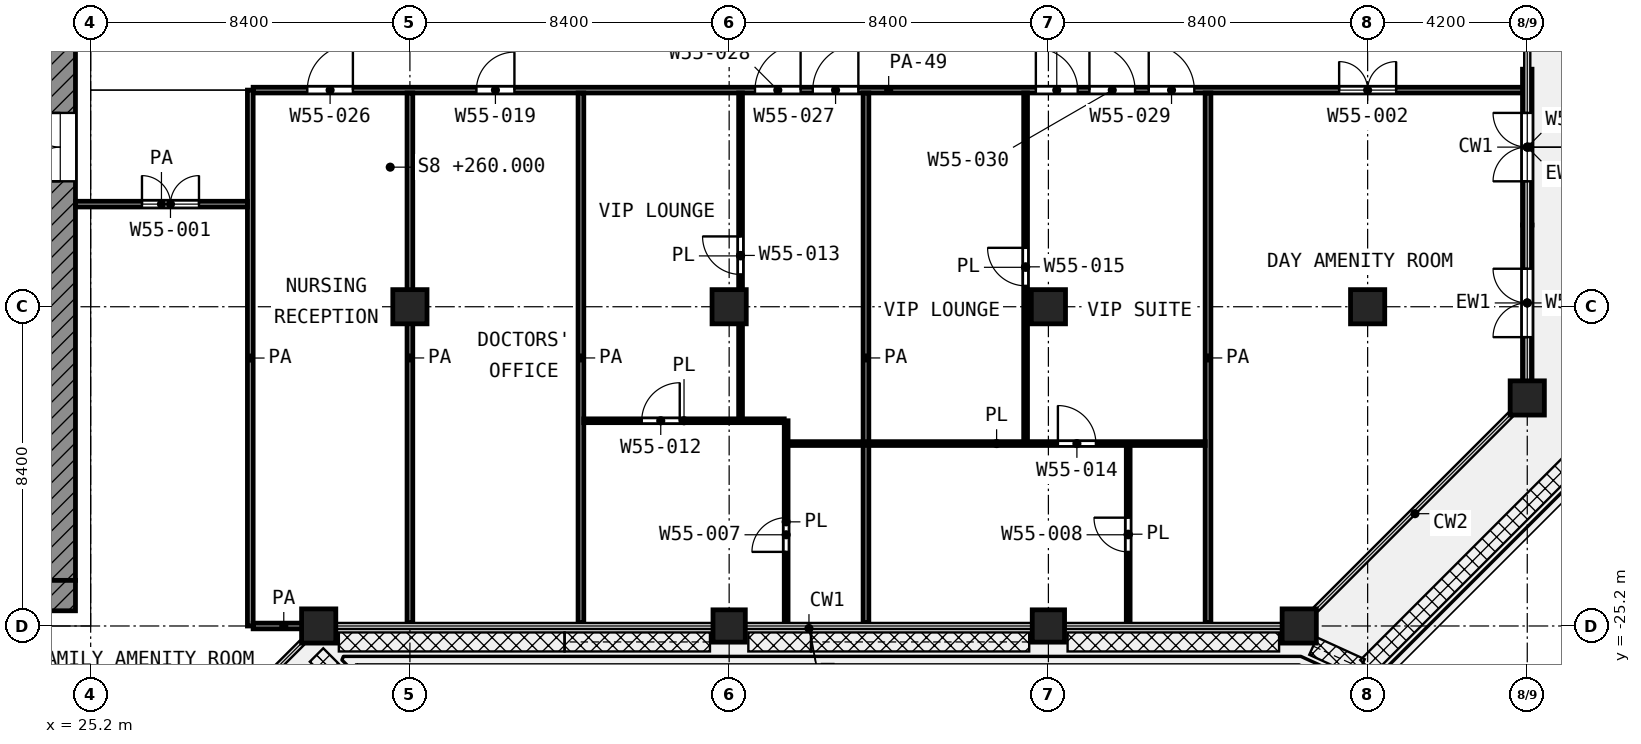
"""IFC4 building model, lengths in metres.
Left out: names, types, materials, properties, quantities, classifications, styles, units other than length and angle.
Written with IfcOpenShell. Run it as: python <this file> out.ifc"""

import sys

from ifc_helpers import new_model, si_unit, direction, frame, frame_2d, origin, origin_2d, place, context, subcontext, project, spatial, rectangle, extrude, element, fill, save


model = new_model("IFC4")
c1 = context("Model", 3, precision=1e-05, world=origin(), true_north=direction((0.0, 1.0)))
c2 = subcontext(c1, "Body", "Model", "MODEL_VIEW")
j1 = project(units=[si_unit("LENGTHUNIT", "METRE"), si_unit("PLANEANGLEUNIT", "RADIAN")], contexts=[c1])
p1 = place(None, origin())
s1 = spatial("IfcSite", under=j1, at=p1, CompositionType="ELEMENT")
p2 = place(p1, origin())
s2 = spatial("IfcBuilding", under=s1, at=p2, CompositionType="ELEMENT")
p3 = place(p2, frame((0.0, 0.0, 260.0)))
s3 = spatial("IfcBuildingStorey", under=s2, at=p3, CompositionType="ELEMENT", Elevation=260.0)
for number, where, z_axis, x_axis in (
    (1, (33.6, -16.8, 0.0), (0.0, 0.0, 1.0), (1.0, 0.0, 0.0)),
    (2, (42.0, -16.8, 0.0), (0.0, 0.0, 1.0), (1.0, 0.0, 0.0)),
    (3, (50.4, -16.8, 0.0), (0.0, 0.0, 1.0), (1.0, 0.0, 0.0)),
    (4, (58.8, -16.8, 0.0), (0.0, 0.0, 1.0), (1.0, 0.0, 0.0)),
    (5, (63.0, -19.2, 0.0), (0.0, 0.0, 1.0), (1.0, 0.0, 0.0)),
    (6, (31.2, -25.2, 0.0), (0.0, 0.0, 1.0), (1.0, 0.0, 0.0)),
):
    element("IfcColumn", number, at=place(p3, frame(where, z_axis=z_axis, x_axis=x_axis)), inside=s3, PredefinedType="COLUMN", context=c2, shape_type="SweptSolid", body=[
        extrude(rectangle(XDim=0.9, YDim=0.9, at=origin_2d()), origin(), (0.0, 0.0, 1.0), 4.2),
    ])
for number, where, z_axis, x_axis in (
    (7, (42.0, -25.2, 0.0), (0.0, 0.0, 1.0), (1.0, 0.0, 0.0)),
    (8, (50.4, -25.2, 0.0), (0.0, 0.0, 1.0), (1.0, 0.0, 0.0)),
):
    element("IfcColumn", number, at=place(p3, frame(where, z_axis=z_axis, x_axis=x_axis)), inside=s3, PredefinedType="COLUMN", context=c2, shape_type="SweptSolid", body=[
        extrude(rectangle(XDim=0.85, YDim=0.85, at=origin_2d()), origin(), (0.0, 0.0, 1.0), 4.2),
    ])
p4 = place(p3, frame((57.0, -25.2, 0.0), z_axis=(0.0, 0.0, 1.0), x_axis=(1.0, 0.0, 0.0)))
e9 = element("IfcColumn", 9, at=p4, inside=s3, PredefinedType="COLUMN", context=c2, shape_type="SweptSolid", body=[
    extrude(rectangle(XDim=0.9, YDim=0.9, at=origin_2d()), origin(), (0.0, 0.0, 1.0), 4.2),
])
p5 = place(p3, frame((63.0, -18.75, 0.0), z_axis=(0.0, 0.0, 1.0), x_axis=(0.0, 1.0, 0.0)))
e10 = element("IfcWall", 10, at=p5, inside=s3, PredefinedType="SOLIDWALL", context=c2, shape_type="SweptSolid", body=[
    extrude(rectangle(XDim=4.1, YDim=0.25, at=frame_2d((2.05, 0.0))), origin(), (0.0, 0.0, 1.0), 2.58),
])
p6 = place(p5, frame((1.15, 0.0, 0.0)))
e11 = element("IfcOpeningElement", 11, at=p6, cuts=e10, PredefinedType="OPENING", context=c2, shape_type="SweptSolid", body=[
    extrude(rectangle(XDim=1.8, YDim=2.1, at=frame_2d((0.9, 1.05))), frame((0.0, 0.135, 0.0), z_axis=(0.0, -1.0, 0.0), x_axis=(1.0, 0.0, 0.0)), (0.0, 0.0, 1.0), 0.27),
])
p7 = place(p3, frame((63.0, -14.65, 0.0), z_axis=(0.0, 0.0, 1.0), x_axis=(0.0, 1.0, 0.0)))
e12 = element("IfcWall", 12, at=p7, inside=s3, PredefinedType="SOLIDWALL", context=c2, shape_type="SweptSolid", body=[
    extrude(rectangle(XDim=4.1, YDim=0.25, at=frame_2d((2.05, 0.0))), origin(), (0.0, 0.0, 1.0), 2.58),
])
p8 = place(p7, frame((1.15, 0.0, 0.0)))
e13 = element("IfcOpeningElement", 13, at=p8, cuts=e12, PredefinedType="OPENING", context=c2, shape_type="SweptSolid", body=[
    extrude(rectangle(XDim=1.8, YDim=2.1, at=frame_2d((0.9, 1.05))), frame((0.0, 0.135, 0.0), z_axis=(0.0, -1.0, 0.0), x_axis=(1.0, 0.0, 0.0)), (0.0, 0.0, 1.0), 0.27),
])
p9 = place(p3, frame((24.4, -24.0, 0.0), z_axis=(0.0, 0.0, 1.0), x_axis=(0.0, 1.0, 0.0)))
e14 = element("IfcWall", 14, at=p9, inside=s3, PredefinedType="SHEAR", context=c2, shape_type="SweptSolid", body=[
    extrude(rectangle(XDim=18.6, YDim=0.8, at=frame_2d((9.3, 0.0))), origin(), (0.0, 0.0, 1.0), 3.6),
])
p10 = place(p9, frame((10.5, 0.0, 0.0)))
e15 = element("IfcOpeningElement", 15, at=p10, cuts=e14, PredefinedType="OPENING", context=c2, shape_type="SweptSolid", body=[
    extrude(rectangle(XDim=1.8, YDim=2.1, at=frame_2d((0.9, 1.05))), frame((0.0, 0.41, 0.0), z_axis=(0.0, -1.0, 0.0), x_axis=(1.0, 0.0, 0.0)), (0.0, 0.0, 1.0), 0.82),
])
p11 = place(p3, frame((24.4, -24.8, 0.0), z_axis=(0.0, 0.0, 1.0), x_axis=(0.0, 1.0, 0.0)))
e16 = element("IfcWall", 16, at=p11, inside=s3, PredefinedType="SHEAR", context=c2, shape_type="SweptSolid", body=[
    extrude(rectangle(XDim=0.8, YDim=0.8, at=frame_2d((0.4, 0.0))), origin(), (0.0, 0.0, 1.0), 3.6),
])
p12 = place(p3, frame((43.55, -20.4, 0.0), z_axis=(0.0, 0.0, 1.0), x_axis=(1.0, 0.0, 0.0)))
e17 = element("IfcWall", 17, at=p12, inside=s3, PredefinedType="PARTITIONING", context=c2, shape_type="SweptSolid", body=[
    extrude(rectangle(XDim=10.975, YDim=0.1, at=frame_2d((5.487, 0.0))), origin(), (0.0, 0.0, 1.0), 3.6),
])
p13 = place(p12, frame((7.1, 0.0, 0.0)))
e18 = element("IfcOpeningElement", 18, at=p13, cuts=e17, PredefinedType="OPENING", context=c2, shape_type="SweptSolid", body=[
    extrude(rectangle(XDim=1.0, YDim=2.1, at=frame_2d((0.5, 1.05))), frame((0.0, 0.06, 0.0), z_axis=(0.0, -1.0, 0.0), x_axis=(1.0, 0.0, 0.0)), (0.0, 0.0, 1.0), 0.12),
])
p14 = place(p3, frame((38.175, -19.8, 0.0), z_axis=(0.0, 0.0, 1.0), x_axis=(1.0, 0.0, 0.0)))
e19 = element("IfcWall", 19, at=p14, inside=s3, PredefinedType="PARTITIONING", context=c2, shape_type="SweptSolid", body=[
    extrude(rectangle(XDim=5.275, YDim=0.1, at=frame_2d((2.637, 0.0))), origin(), (0.0, 0.0, 1.0), 3.6),
])
p15 = place(p14, frame((1.525, 0.0, 0.0)))
e20 = element("IfcOpeningElement", 20, at=p15, cuts=e19, PredefinedType="OPENING", context=c2, shape_type="SweptSolid", body=[
    extrude(rectangle(XDim=1.0, YDim=2.1, at=frame_2d((0.5, 1.05))), frame((0.0, 0.06, 0.0), z_axis=(0.0, -1.0, 0.0), x_axis=(1.0, 0.0, 0.0)), (0.0, 0.0, 1.0), 0.12),
])
p16 = place(p3, frame((42.3, -19.75, 0.0), z_axis=(0.0, 0.0, 1.0), x_axis=(0.0, 1.0, 0.0)))
e21 = element("IfcWall", 21, at=p16, inside=s3, PredefinedType="PARTITIONING", context=c2, shape_type="SweptSolid", body=[
    extrude(rectangle(XDim=8.575, YDim=0.1, at=frame_2d((4.288, 0.0))), origin(), (0.0, 0.0, 1.0), 3.6),
])
p17 = place(p16, frame((3.8, 0.0, 0.0)))
e22 = element("IfcOpeningElement", 22, at=p17, cuts=e21, PredefinedType="OPENING", context=c2, shape_type="SweptSolid", body=[
    extrude(rectangle(XDim=1.0, YDim=2.1, at=frame_2d((0.5, 1.05))), frame((0.0, 0.06, 0.0), z_axis=(0.0, -1.0, 0.0), x_axis=(1.0, 0.0, 0.0)), (0.0, 0.0, 1.0), 0.12),
])
p18 = place(p3, frame((43.5, -25.12, 0.0), z_axis=(0.0, 0.0, 1.0), x_axis=(0.0, 1.0, 0.0)))
e23 = element("IfcWall", 23, at=p18, inside=s3, PredefinedType="PARTITIONING", context=c2, shape_type="SweptSolid", body=[
    extrude(rectangle(XDim=5.32, YDim=0.1, at=frame_2d((2.66, 0.0))), origin(), (0.0, 0.0, 1.0), 3.6),
])
p19 = place(p18, frame((1.87, 0.0, 0.0)))
e24 = element("IfcOpeningElement", 24, at=p19, cuts=e23, PredefinedType="OPENING", context=c2, shape_type="SweptSolid", body=[
    extrude(rectangle(XDim=0.9, YDim=2.1, at=frame_2d((0.45, 1.05))), frame((0.0, 0.06, 0.0), z_axis=(0.0, -1.0, 0.0), x_axis=(1.0, 0.0, 0.0)), (0.0, 0.0, 1.0), 0.12),
])
p20 = place(p3, frame((49.8, -20.35, 0.0), z_axis=(0.0, 0.0, 1.0), x_axis=(0.0, 1.0, 0.0)))
e25 = element("IfcWall", 25, at=p20, inside=s3, PredefinedType="PARTITIONING", context=c2, shape_type="SweptSolid", body=[
    extrude(rectangle(XDim=9.175, YDim=0.1, at=frame_2d((4.587, 0.0))), origin(), (0.0, 0.0, 1.0), 3.6),
])
p21 = place(p20, frame((4.1, 0.0, 0.0)))
e26 = element("IfcOpeningElement", 26, at=p21, cuts=e25, PredefinedType="OPENING", context=c2, shape_type="SweptSolid", body=[
    extrude(rectangle(XDim=1.0, YDim=2.1, at=frame_2d((0.5, 1.05))), frame((0.0, 0.06, 0.0), z_axis=(0.0, -1.0, 0.0), x_axis=(1.0, 0.0, 0.0)), (0.0, 0.0, 1.0), 0.12),
])
p22 = place(p3, frame((52.5, -25.12, 0.0), z_axis=(0.0, 0.0, 1.0), x_axis=(0.0, 1.0, 0.0)))
e27 = element("IfcWall", 27, at=p22, inside=s3, PredefinedType="PARTITIONING", context=c2, shape_type="SweptSolid", body=[
    extrude(rectangle(XDim=4.67, YDim=0.1, at=frame_2d((2.335, 0.0))), origin(), (0.0, 0.0, 1.0), 3.6),
])
p23 = place(p22, frame((1.87, 0.0, 0.0)))
e28 = element("IfcOpeningElement", 28, at=p23, cuts=e27, PredefinedType="OPENING", context=c2, shape_type="SweptSolid", body=[
    extrude(rectangle(XDim=0.9, YDim=2.1, at=frame_2d((0.45, 1.05))), frame((0.0, 0.06, 0.0), z_axis=(0.0, -1.0, 0.0), x_axis=(1.0, 0.0, 0.0)), (0.0, 0.0, 1.0), 0.12),
])
p24 = place(p3, frame((29.475, -25.2, 0.0), z_axis=(0.0, 0.0, 1.0), x_axis=(1.0, 0.0, 0.0)))
e29 = element("IfcWall", 29, at=p24, inside=s3, PredefinedType="PARTITIONING", context=c2, shape_type="SweptSolid", body=[
    extrude(rectangle(XDim=1.612, YDim=0.15, at=frame_2d((0.806, 0.0))), origin(), (0.0, 0.0, 1.0), 3.6),
])
p25 = place(p3, frame((24.8, -14.1, 0.0), z_axis=(0.0, 0.0, 1.0), x_axis=(1.0, 0.0, 0.0)))
e30 = element("IfcWall", 30, at=p25, inside=s3, PredefinedType="PARTITIONING", context=c2, shape_type="SweptSolid", body=[
    extrude(rectangle(XDim=4.525, YDim=0.15, at=frame_2d((2.262, 0.0))), origin(), (0.0, 0.0, 1.0), 3.6),
])
p26 = place(p25, frame((1.75, 0.0, 0.0)))
e31 = element("IfcOpeningElement", 31, at=p26, cuts=e30, PredefinedType="OPENING", context=c2, shape_type="SweptSolid", body=[
    extrude(rectangle(XDim=1.5, YDim=2.1, at=frame_2d((0.75, 1.05))), frame((0.0, 0.085, 0.0), z_axis=(0.0, -1.0, 0.0), x_axis=(1.0, 0.0, 0.0)), (0.0, 0.0, 1.0), 0.17),
])
p27 = place(p3, frame((29.475, -11.1, 0.0), z_axis=(0.0, 0.0, 1.0), x_axis=(1.0, 0.0, 0.0)))
e32 = element("IfcWall", 32, at=p27, inside=s3, PredefinedType="PARTITIONING", context=c2, shape_type="SweptSolid", body=[
    extrude(rectangle(XDim=33.445, YDim=0.15, at=frame_2d((16.722, 0.0))), origin(), (0.0, 0.0, 1.0), 2.7),
])
p28 = place(p27, frame((1.425, 0.0, 0.0)))
e33 = element("IfcOpeningElement", 33, at=p28, cuts=e32, PredefinedType="OPENING", context=c2, shape_type="SweptSolid", body=[
    extrude(rectangle(XDim=1.2, YDim=2.1, at=frame_2d((0.6, 1.05))), frame((0.0, 0.085, 0.0), z_axis=(0.0, -1.0, 0.0), x_axis=(1.0, 0.0, 0.0)), (0.0, 0.0, 1.0), 0.17),
])
p29 = place(p27, frame((5.875, 0.0, 0.0)))
e34 = element("IfcOpeningElement", 34, at=p29, cuts=e32, PredefinedType="OPENING", context=c2, shape_type="SweptSolid", body=[
    extrude(rectangle(XDim=1.0, YDim=2.1, at=frame_2d((0.5, 1.05))), frame((0.0, 0.085, 0.0), z_axis=(0.0, -1.0, 0.0), x_axis=(1.0, 0.0, 0.0)), (0.0, 0.0, 1.0), 0.17),
])
p30 = place(p27, frame((14.725, 0.0, 0.0)))
e35 = element("IfcOpeningElement", 35, at=p30, cuts=e32, PredefinedType="OPENING", context=c2, shape_type="SweptSolid", body=[
    extrude(rectangle(XDim=1.2, YDim=2.1, at=frame_2d((0.6, 1.05))), frame((0.0, 0.085, 0.0), z_axis=(0.0, -1.0, 0.0), x_axis=(1.0, 0.0, 0.0)), (0.0, 0.0, 1.0), 0.17),
])
p31 = place(p27, frame((13.205, 0.0, 0.0)))
e36 = element("IfcOpeningElement", 36, at=p31, cuts=e32, PredefinedType="OPENING", context=c2, shape_type="SweptSolid", body=[
    extrude(rectangle(XDim=1.2, YDim=2.1, at=frame_2d((0.6, 1.05))), frame((0.0, 0.085, 0.0), z_axis=(0.0, -1.0, 0.0), x_axis=(1.0, 0.0, 0.0)), (0.0, 0.0, 1.0), 0.17),
])
p32 = place(p27, frame((23.565, 0.0, 0.0)))
e37 = element("IfcOpeningElement", 37, at=p32, cuts=e32, PredefinedType="OPENING", context=c2, shape_type="SweptSolid", body=[
    extrude(rectangle(XDim=1.2, YDim=2.1, at=frame_2d((0.6, 1.05))), frame((0.0, 0.085, 0.0), z_axis=(0.0, -1.0, 0.0), x_axis=(1.0, 0.0, 0.0)), (0.0, 0.0, 1.0), 0.17),
])
p33 = place(p27, frame((22.005, 0.0, 0.0)))
e38 = element("IfcOpeningElement", 38, at=p33, cuts=e32, PredefinedType="OPENING", context=c2, shape_type="SweptSolid", body=[
    extrude(rectangle(XDim=1.2, YDim=2.1, at=frame_2d((0.6, 1.05))), frame((0.0, 0.085, 0.0), z_axis=(0.0, -1.0, 0.0), x_axis=(1.0, 0.0, 0.0)), (0.0, 0.0, 1.0), 0.17),
])
p34 = place(p27, frame((20.595, 0.0, 0.0)))
e39 = element("IfcOpeningElement", 39, at=p34, cuts=e32, PredefinedType="OPENING", context=c2, shape_type="SweptSolid", body=[
    extrude(rectangle(XDim=1.1, YDim=2.1, at=frame_2d((0.55, 1.05))), frame((0.0, 0.085, 0.0), z_axis=(0.0, -1.0, 0.0), x_axis=(1.0, 0.0, 0.0)), (0.0, 0.0, 1.0), 0.17),
])
p35 = place(p27, frame((28.575, 0.0, 0.0)))
e40 = element("IfcOpeningElement", 40, at=p35, cuts=e32, PredefinedType="OPENING", context=c2, shape_type="SweptSolid", body=[
    extrude(rectangle(XDim=1.5, YDim=2.1, at=frame_2d((0.75, 1.05))), frame((0.0, 0.085, 0.0), z_axis=(0.0, -1.0, 0.0), x_axis=(1.0, 0.0, 0.0)), (0.0, 0.0, 1.0), 0.17),
])
p36 = place(p3, frame((29.4, -25.2, 0.0), z_axis=(0.0, 0.0, 1.0), x_axis=(0.0, 1.0, 0.0)))
e41 = element("IfcWall", 41, at=p36, inside=s3, PredefinedType="PARTITIONING", context=c2, shape_type="SweptSolid", body=[
    extrude(rectangle(XDim=14.1, YDim=0.15, at=frame_2d((7.05, 0.0))), origin(), (0.0, 0.0, 1.0), 3.6),
])
for number, where, z_axis, x_axis in (
    (42, (33.6, -25.12, 0.0), (0.0, 0.0, 1.0), (0.0, 1.0, 0.0)),
    (43, (38.1, -25.12, 0.0), (0.0, 0.0, 1.0), (0.0, 1.0, 0.0)),
    (44, (45.6, -25.12, 0.0), (0.0, 0.0, 1.0), (0.0, 1.0, 0.0)),
    (45, (54.6, -25.12, 0.0), (0.0, 0.0, 1.0), (0.0, 1.0, 0.0)),
):
    element("IfcWall", number, at=place(p3, frame(where, z_axis=z_axis, x_axis=x_axis)), inside=s3, PredefinedType="PARTITIONING", context=c2, shape_type="SweptSolid", body=[
        extrude(rectangle(XDim=13.945, YDim=0.15, at=frame_2d((6.973, 0.0))), origin(), (0.0, 0.0, 1.0), 3.6),
    ])
p37 = place(p6, origin())
e46 = element("IfcDoor", 46, at=p37, inside=s3, OperationType="DOUBLE_DOOR_SINGLE_SWING", PredefinedType="DOOR", context=c2, shape_type="SweptSolid", body=[
    extrude(rectangle(XDim=1.8, YDim=2.1, at=frame_2d((0.9, 1.05))), frame((0.0, 0.025, 0.0), z_axis=(0.0, -1.0, 0.0), x_axis=(1.0, 0.0, 0.0)), (0.0, 0.0, 1.0), 0.05),
])
fill(e11, e46)
p38 = place(p8, origin())
e47 = element("IfcDoor", 47, at=p38, inside=s3, OperationType="DOUBLE_DOOR_SINGLE_SWING", PredefinedType="DOOR", context=c2, shape_type="SweptSolid", body=[
    extrude(rectangle(XDim=1.8, YDim=2.1, at=frame_2d((0.9, 1.05))), frame((0.0, 0.025, 0.0), z_axis=(0.0, -1.0, 0.0), x_axis=(1.0, 0.0, 0.0)), (0.0, 0.0, 1.0), 0.05),
])
fill(e13, e47)
p39 = place(p10, origin())
e48 = element("IfcDoor", 48, at=p39, inside=s3, OperationType="DOUBLE_DOOR_SINGLE_SWING", PredefinedType="DOOR", context=c2, shape_type="SweptSolid", body=[
    extrude(rectangle(XDim=1.8, YDim=2.1, at=frame_2d((0.9, 1.05))), frame((0.0, 0.025, 0.0), z_axis=(0.0, -1.0, 0.0), x_axis=(1.0, 0.0, 0.0)), (0.0, 0.0, 1.0), 0.05),
])
fill(e15, e48)
p40 = place(p26, origin())
e49 = element("IfcDoor", 49, at=p40, inside=s3, OperationType="DOUBLE_DOOR_SINGLE_SWING", PredefinedType="DOOR", context=c2, shape_type="SweptSolid", body=[
    extrude(rectangle(XDim=1.5, YDim=2.1, at=frame_2d((0.75, 1.05))), frame((0.0, 0.025, 0.0), z_axis=(0.0, -1.0, 0.0), x_axis=(1.0, 0.0, 0.0)), (0.0, 0.0, 1.0), 0.05),
])
fill(e31, e49)
p41 = place(p28, origin())
e50 = element("IfcDoor", 50, at=p41, inside=s3, OperationType="SINGLE_SWING_RIGHT", PredefinedType="DOOR", context=c2, shape_type="SweptSolid", body=[
    extrude(rectangle(XDim=1.2, YDim=2.1, at=frame_2d((0.6, 1.05))), frame((0.0, 0.025, 0.0), z_axis=(0.0, -1.0, 0.0), x_axis=(1.0, 0.0, 0.0)), (0.0, 0.0, 1.0), 0.05),
])
fill(e33, e50)
p42 = place(p29, origin())
e51 = element("IfcDoor", 51, at=p42, inside=s3, OperationType="SINGLE_SWING_RIGHT", PredefinedType="DOOR", context=c2, shape_type="SweptSolid", body=[
    extrude(rectangle(XDim=1.0, YDim=2.1, at=frame_2d((0.5, 1.05))), frame((0.0, 0.025, 0.0), z_axis=(0.0, -1.0, 0.0), x_axis=(1.0, 0.0, 0.0)), (0.0, 0.0, 1.0), 0.05),
])
fill(e34, e51)
p43 = place(p30, origin())
e52 = element("IfcDoor", 52, at=p43, inside=s3, OperationType="SINGLE_SWING_RIGHT", PredefinedType="DOOR", context=c2, shape_type="SweptSolid", body=[
    extrude(rectangle(XDim=1.2, YDim=2.1, at=frame_2d((0.6, 1.05))), frame((0.0, 0.025, 0.0), z_axis=(0.0, -1.0, 0.0), x_axis=(1.0, 0.0, 0.0)), (0.0, 0.0, 1.0), 0.05),
])
fill(e35, e52)
p44 = place(p31, origin())
e53 = element("IfcDoor", 53, at=p44, inside=s3, OperationType="SINGLE_SWING_RIGHT", PredefinedType="DOOR", context=c2, shape_type="SweptSolid", body=[
    extrude(rectangle(XDim=1.2, YDim=2.1, at=frame_2d((0.6, 1.05))), frame((0.0, 0.025, 0.0), z_axis=(0.0, -1.0, 0.0), x_axis=(1.0, 0.0, 0.0)), (0.0, 0.0, 1.0), 0.05),
])
fill(e36, e53)
p45 = place(p15, origin())
e54 = element("IfcDoor", 54, at=p45, inside=s3, OperationType="SINGLE_SWING_RIGHT", PredefinedType="DOOR", context=c2, shape_type="SweptSolid", body=[
    extrude(rectangle(XDim=1.0, YDim=2.1, at=frame_2d((0.5, 1.05))), frame((0.0, 0.025, 0.0), z_axis=(0.0, -1.0, 0.0), x_axis=(1.0, 0.0, 0.0)), (0.0, 0.0, 1.0), 0.05),
])
fill(e20, e54)
p46 = place(p17, origin())
e55 = element("IfcDoor", 55, at=p46, inside=s3, OperationType="SINGLE_SWING_RIGHT", PredefinedType="DOOR", context=c2, shape_type="SweptSolid", body=[
    extrude(rectangle(XDim=1.0, YDim=2.1, at=frame_2d((0.5, 1.05))), frame((0.0, 0.025, 0.0), z_axis=(0.0, -1.0, 0.0), x_axis=(1.0, 0.0, 0.0)), (0.0, 0.0, 1.0), 0.05),
])
fill(e22, e55)
p47 = place(p19, origin())
e56 = element("IfcDoor", 56, at=p47, inside=s3, OperationType="SINGLE_SWING_LEFT", PredefinedType="DOOR", context=c2, shape_type="SweptSolid", body=[
    extrude(rectangle(XDim=0.9, YDim=2.1, at=frame_2d((0.45, 1.05))), frame((0.0, 0.025, 0.0), z_axis=(0.0, -1.0, 0.0), x_axis=(1.0, 0.0, 0.0)), (0.0, 0.0, 1.0), 0.05),
])
fill(e24, e56)
p48 = place(p32, origin())
e57 = element("IfcDoor", 57, at=p48, inside=s3, OperationType="SINGLE_SWING_LEFT", PredefinedType="DOOR", context=c2, shape_type="SweptSolid", body=[
    extrude(rectangle(XDim=1.2, YDim=2.1, at=frame_2d((0.6, 1.05))), frame((0.0, 0.025, 0.0), z_axis=(0.0, -1.0, 0.0), x_axis=(1.0, 0.0, 0.0)), (0.0, 0.0, 1.0), 0.05),
])
fill(e37, e57)
p49 = place(p33, origin())
e58 = element("IfcDoor", 58, at=p49, inside=s3, OperationType="SINGLE_SWING_LEFT", PredefinedType="DOOR", context=c2, shape_type="SweptSolid", body=[
    extrude(rectangle(XDim=1.2, YDim=2.1, at=frame_2d((0.6, 1.05))), frame((0.0, 0.025, 0.0), z_axis=(0.0, -1.0, 0.0), x_axis=(1.0, 0.0, 0.0)), (0.0, 0.0, 1.0), 0.05),
])
fill(e38, e58)
p50 = place(p34, origin())
e59 = element("IfcDoor", 59, at=p50, inside=s3, OperationType="SINGLE_SWING_LEFT", PredefinedType="DOOR", context=c2, shape_type="SweptSolid", body=[
    extrude(rectangle(XDim=1.1, YDim=2.1, at=frame_2d((0.55, 1.05))), frame((0.0, 0.025, 0.0), z_axis=(0.0, -1.0, 0.0), x_axis=(1.0, 0.0, 0.0)), (0.0, 0.0, 1.0), 0.05),
])
fill(e39, e59)
p51 = place(p13, origin())
e60 = element("IfcDoor", 60, at=p51, inside=s3, OperationType="SINGLE_SWING_LEFT", PredefinedType="DOOR", context=c2, shape_type="SweptSolid", body=[
    extrude(rectangle(XDim=1.0, YDim=2.1, at=frame_2d((0.5, 1.05))), frame((0.0, 0.025, 0.0), z_axis=(0.0, -1.0, 0.0), x_axis=(1.0, 0.0, 0.0)), (0.0, 0.0, 1.0), 0.05),
])
fill(e18, e60)
p52 = place(p21, origin())
e61 = element("IfcDoor", 61, at=p52, inside=s3, OperationType="SINGLE_SWING_RIGHT", PredefinedType="DOOR", context=c2, shape_type="SweptSolid", body=[
    extrude(rectangle(XDim=1.0, YDim=2.1, at=frame_2d((0.5, 1.05))), frame((0.0, 0.025, 0.0), z_axis=(0.0, -1.0, 0.0), x_axis=(1.0, 0.0, 0.0)), (0.0, 0.0, 1.0), 0.05),
])
fill(e26, e61)
p53 = place(p23, origin())
e62 = element("IfcDoor", 62, at=p53, inside=s3, OperationType="SINGLE_SWING_RIGHT", PredefinedType="DOOR", context=c2, shape_type="SweptSolid", body=[
    extrude(rectangle(XDim=0.9, YDim=2.1, at=frame_2d((0.45, 1.05))), frame((0.0, 0.025, 0.0), z_axis=(0.0, -1.0, 0.0), x_axis=(1.0, 0.0, 0.0)), (0.0, 0.0, 1.0), 0.05),
])
fill(e28, e62)
p54 = place(p35, origin())
e63 = element("IfcDoor", 63, at=p54, inside=s3, OperationType="DOUBLE_DOOR_SINGLE_SWING", PredefinedType="DOOR", context=c2, shape_type="SweptSolid", body=[
    extrude(rectangle(XDim=1.5, YDim=2.1, at=frame_2d((0.75, 1.05))), frame((0.0, 0.025, 0.0), z_axis=(0.0, -1.0, 0.0), x_axis=(1.0, 0.0, 0.0)), (0.0, 0.0, 1.0), 0.05),
])
fill(e40, e63)
save(model, sys.argv[1])
